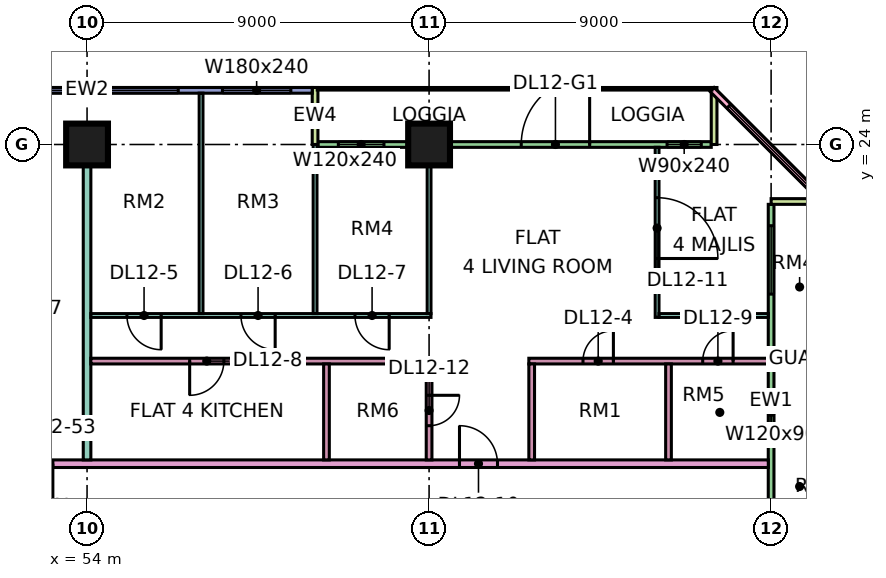
"""IFC4 building model, lengths in metres.
Left out: names, types, materials, properties, quantities, classifications, styles, units other than length and angle.
Written with IfcOpenShell. Run it as: python <this file> out.ifc"""

import sys

from ifc_helpers import new_model, si_unit, direction, frame, frame_2d, origin, origin_2d, place, context, subcontext, project, spatial, rectangle, extrude, element, fill, save


model = new_model("IFC4")
c1 = context("Model", 3, precision=1e-05, world=origin(), true_north=direction((0.0, 1.0)))
c2 = subcontext(c1, "Body", "Model", "MODEL_VIEW")
j1 = project(units=[si_unit("LENGTHUNIT", "METRE"), si_unit("PLANEANGLEUNIT", "RADIAN")], contexts=[c1])
p1 = place(None, origin())
s1 = spatial("IfcSite", under=j1, at=p1, CompositionType="ELEMENT")
p2 = place(p1, origin())
s2 = spatial("IfcBuilding", under=s1, at=p2, CompositionType="ELEMENT")
p3 = place(p2, frame((0.0, 0.0, 60.15)))
s3 = spatial("IfcBuildingStorey", under=s2, at=p3, CompositionType="ELEMENT", Elevation=60.15)
for number, where, z_axis, x_axis in (
    (1, (54.0, 24.0, 0.0), (0.0, 0.0, 1.0), (1.0, 0.0, 0.0)),
    (2, (63.0, 24.0, 0.0), (0.0, 0.0, 1.0), (1.0, 0.0, 0.0)),
):
    element("IfcColumn", number, at=place(p3, frame(where, z_axis=z_axis, x_axis=x_axis)), inside=s3, PredefinedType="COLUMN", context=c2, shape_type="SweptSolid", body=[
        extrude(rectangle(XDim=1.1, YDim=1.1, at=origin_2d()), origin(), (0.0, 0.0, 1.0), 3.75),
    ])
p4 = place(p3, frame((70.425, 24.0, 0.0), z_axis=(0.0, 0.0, 1.0), x_axis=(-1.0, 0.0, 0.0)))
e3 = element("IfcWall", 3, at=p4, inside=s3, PredefinedType="SOLIDWALL", context=c2, shape_type="SweptSolid", body=[
    extrude(rectangle(XDim=10.35, YDim=0.15, at=frame_2d((5.175, 0.0))), origin(), (0.0, 0.0, 1.0), 3.35),
])
p5 = place(p4, frame((0.262, 0.0, 0.45)))
e4 = element("IfcOpeningElement", 4, at=p5, cuts=e3, PredefinedType="OPENING", context=c2, shape_type="SweptSolid", body=[
    extrude(rectangle(XDim=0.9, YDim=2.4, at=frame_2d((0.45, 1.2))), frame((0.0, 0.085, 0.0), z_axis=(0.0, -1.0, 0.0), x_axis=(1.0, 0.0, 0.0)), (0.0, 0.0, 1.0), 0.17),
])
p6 = place(p4, frame((3.2, 0.0, 0.0)))
e5 = element("IfcOpeningElement", 5, at=p6, cuts=e3, PredefinedType="OPENING", context=c2, shape_type="SweptSolid", body=[
    extrude(rectangle(XDim=1.8, YDim=2.4, at=frame_2d((0.9, 1.2))), frame((0.0, 0.085, 0.0), z_axis=(0.0, -1.0, 0.0), x_axis=(1.0, 0.0, 0.0)), (0.0, 0.0, 1.0), 0.17),
])
p7 = place(p4, frame((8.613, 0.0, 0.45)))
e6 = element("IfcOpeningElement", 6, at=p7, cuts=e3, PredefinedType="OPENING", context=c2, shape_type="SweptSolid", body=[
    extrude(rectangle(XDim=1.2, YDim=2.4, at=frame_2d((0.6, 1.2))), frame((0.0, 0.085, 0.0), z_axis=(0.0, -1.0, 0.0), x_axis=(1.0, 0.0, 0.0)), (0.0, 0.0, 1.0), 0.17),
])
for number, where, z_axis, x_axis in (
    (7, (70.5, 25.5, 0.0), (0.0, 0.0, 1.0), (0.0, -1.0, 0.0)),
    (8, (60.0, 25.5, 0.0), (0.0, 0.0, 1.0), (0.0, -1.0, 0.0)),
):
    element("IfcWall", number, at=place(p3, frame(where, z_axis=z_axis, x_axis=x_axis)), inside=s3, PredefinedType="SOLIDWALL", context=c2, shape_type="SweptSolid", body=[
        extrude(rectangle(XDim=1.5, YDim=0.15, at=frame_2d((0.75, 0.0))), origin(), (0.0, 0.0, 1.0), 3.35),
    ])
p8 = place(p3, frame((59.925, 25.425, 0.0), z_axis=(0.0, 0.0, 1.0), x_axis=(-1.0, 0.0, 0.0)))
e9 = element("IfcWall", 9, at=p8, inside=s3, PredefinedType="SOLIDWALL", context=c2, shape_type="SweptSolid", body=[
    extrude(rectangle(XDim=11.85, YDim=0.15, at=frame_2d((5.925, 0.0))), origin(), (0.0, 0.0, 1.0), 3.35),
])
p9 = place(p8, frame((0.562, 0.0, 0.45)))
e10 = element("IfcOpeningElement", 10, at=p9, cuts=e9, PredefinedType="OPENING", context=c2, shape_type="SweptSolid", body=[
    extrude(rectangle(XDim=1.8, YDim=2.4, at=frame_2d((0.9, 1.2))), frame((0.0, 0.085, 0.0), z_axis=(0.0, -1.0, 0.0), x_axis=(1.0, 0.0, 0.0)), (0.0, 0.0, 1.0), 0.17),
])
p10 = place(p8, frame((3.525, 0.0, 0.45)))
e11 = element("IfcOpeningElement", 11, at=p10, cuts=e9, PredefinedType="OPENING", context=c2, shape_type="SweptSolid", body=[
    extrude(rectangle(XDim=1.8, YDim=2.4, at=frame_2d((0.9, 1.2))), frame((0.0, 0.085, 0.0), z_axis=(0.0, -1.0, 0.0), x_axis=(1.0, 0.0, 0.0)), (0.0, 0.0, 1.0), 0.17),
])
p11 = place(p8, frame((6.488, 0.0, 0.45)))
e12 = element("IfcOpeningElement", 12, at=p11, cuts=e9, PredefinedType="OPENING", context=c2, shape_type="SweptSolid", body=[
    extrude(rectangle(XDim=4.8, YDim=2.4, at=frame_2d((2.4, 1.2))), frame((0.0, 0.085, 0.0), z_axis=(0.0, -1.0, 0.0), x_axis=(1.0, 0.0, 0.0)), (0.0, 0.0, 1.0), 0.17),
])
p12 = place(p3, frame((72.0, 12.075, 0.0), z_axis=(0.0, 0.0, 1.0), x_axis=(0.0, 1.0, 0.0)))
e13 = element("IfcWall", 13, at=p12, inside=s3, PredefinedType="SOLIDWALL", context=c2, shape_type="SweptSolid", body=[
    extrude(rectangle(XDim=10.35, YDim=0.15, at=frame_2d((5.175, 0.0))), origin(), (0.0, 0.0, 1.0), 3.35),
])
p13 = place(p12, frame((4.275, 0.0, 1.7)))
e14 = element("IfcOpeningElement", 14, at=p13, cuts=e13, PredefinedType="OPENING", context=c2, shape_type="SweptSolid", body=[
    extrude(rectangle(XDim=1.2, YDim=0.9, at=frame_2d((0.6, 0.45))), frame((0.0, 0.085, 0.0), z_axis=(0.0, -1.0, 0.0), x_axis=(1.0, 0.0, 0.0)), (0.0, 0.0, 1.0), 0.17),
])
p14 = place(p12, frame((7.988, 0.0, 0.45)))
e15 = element("IfcOpeningElement", 15, at=p14, cuts=e13, PredefinedType="OPENING", context=c2, shape_type="SweptSolid", body=[
    extrude(rectangle(XDim=1.8, YDim=2.4, at=frame_2d((0.9, 1.2))), frame((0.0, 0.085, 0.0), z_axis=(0.0, -1.0, 0.0), x_axis=(1.0, 0.0, 0.0)), (0.0, 0.0, 1.0), 0.17),
])
p15 = place(p3, frame((73.5, 22.5, 0.0), z_axis=(0.0, 0.0, 1.0), x_axis=(-1.0, 0.0, 0.0)))
e16 = element("IfcWall", 16, at=p15, inside=s3, PredefinedType="SOLIDWALL", context=c2, shape_type="SweptSolid", body=[
    extrude(rectangle(XDim=1.5, YDim=0.15, at=frame_2d((0.75, 0.0))), origin(), (0.0, 0.0, 1.0), 3.35),
])
p16 = place(p3, frame((73.447, 22.447, 0.0), z_axis=(0.0, 0.0, 1.0), x_axis=(-0.707106781187, 0.707106781187, 0.0)))
e17 = element("IfcWall", 17, at=p16, inside=s3, PredefinedType="SOLIDWALL", context=c2, shape_type="SweptSolid", body=[
    extrude(rectangle(XDim=4.243, YDim=0.15, at=frame_2d((2.121, 0.0))), origin(), (0.0, 0.0, 1.0), 3.35),
])
p17 = place(p16, frame((0.621, 0.0, 0.45)))
e18 = element("IfcOpeningElement", 18, at=p17, cuts=e17, PredefinedType="OPENING", context=c2, shape_type="SweptSolid", body=[
    extrude(rectangle(XDim=3.0, YDim=2.4, at=frame_2d((1.5, 1.2))), frame((0.0, 0.085, 0.0), z_axis=(0.0, -1.0, 0.0), x_axis=(1.0, 0.0, 0.0)), (0.0, 0.0, 1.0), 0.17),
])
p18 = place(p3, frame((51.225, 15.6, 0.0), z_axis=(0.0, 0.0, 1.0), x_axis=(1.0, 0.0, 0.0)))
e19 = element("IfcWall", 19, at=p18, inside=s3, PredefinedType="PARTITIONING", context=c2, shape_type="SweptSolid", body=[
    extrude(rectangle(XDim=20.701, YDim=0.2, at=frame_2d((10.351, 0.0))), origin(), (0.0, 0.0, 1.0), 3.35),
])
p19 = place(p18, frame((12.575, 0.0, 0.0)))
e20 = element("IfcOpeningElement", 20, at=p19, cuts=e19, PredefinedType="OPENING", context=c2, shape_type="SweptSolid", body=[
    extrude(rectangle(XDim=1.0, YDim=2.1, at=frame_2d((0.5, 1.05))), frame((0.0, 0.11, 0.0), z_axis=(0.0, -1.0, 0.0), x_axis=(1.0, 0.0, 0.0)), (0.0, 0.0, 1.0), 0.22),
])
p20 = place(p18, frame((0.875, 0.0, 0.0)))
e21 = element("IfcOpeningElement", 21, at=p20, cuts=e19, PredefinedType="OPENING", context=c2, shape_type="SweptSolid", body=[
    extrude(rectangle(XDim=1.0, YDim=2.1, at=frame_2d((0.5, 1.05))), frame((0.0, 0.11, 0.0), z_axis=(0.0, -1.0, 0.0), x_axis=(1.0, 0.0, 0.0)), (0.0, 0.0, 1.0), 0.22),
])
p21 = place(p3, frame((54.0, 15.7, 0.0), z_axis=(0.0, 0.0, 1.0), x_axis=(0.0, 1.0, 0.0)))
e22 = element("IfcWall", 22, at=p21, inside=s3, PredefinedType="PARTITIONING", context=c2, shape_type="SweptSolid", body=[
    extrude(rectangle(XDim=8.3, YDim=0.2, at=frame_2d((4.15, 0.0))), origin(), (0.0, 0.0, 1.0), 3.35),
])
p22 = place(p3, frame((54.1, 18.3, 0.0), z_axis=(0.0, 0.0, 1.0), x_axis=(1.0, 0.0, 0.0)))
e23 = element("IfcWall", 23, at=p22, inside=s3, PredefinedType="PARTITIONING", context=c2, shape_type="SweptSolid", body=[
    extrude(rectangle(XDim=8.975, YDim=0.15, at=frame_2d((4.487, 0.0))), origin(), (0.0, 0.0, 1.0), 3.35),
])
p23 = place(p22, frame((2.6, 0.0, 0.0)))
e24 = element("IfcOpeningElement", 24, at=p23, cuts=e23, PredefinedType="OPENING", context=c2, shape_type="SweptSolid", body=[
    extrude(rectangle(XDim=0.9, YDim=2.1, at=frame_2d((0.45, 1.05))), frame((0.0, 0.085, 0.0), z_axis=(0.0, -1.0, 0.0), x_axis=(1.0, 0.0, 0.0)), (0.0, 0.0, 1.0), 0.17),
])
p24 = place(p3, frame((54.1, 19.5, 0.0), z_axis=(0.0, 0.0, 1.0), x_axis=(1.0, 0.0, 0.0)))
e25 = element("IfcWall", 25, at=p24, inside=s3, PredefinedType="PARTITIONING", context=c2, shape_type="SweptSolid", body=[
    extrude(rectangle(XDim=8.95, YDim=0.1, at=frame_2d((4.475, 0.0))), origin(), (0.0, 0.0, 1.0), 3.35),
])
p25 = place(p24, frame((0.95, 0.0, 0.0)))
e26 = element("IfcOpeningElement", 26, at=p25, cuts=e25, PredefinedType="OPENING", context=c2, shape_type="SweptSolid", body=[
    extrude(rectangle(XDim=0.9, YDim=2.1, at=frame_2d((0.45, 1.05))), frame((0.0, 0.06, 0.0), z_axis=(0.0, -1.0, 0.0), x_axis=(1.0, 0.0, 0.0)), (0.0, 0.0, 1.0), 0.12),
])
p26 = place(p24, frame((3.95, 0.0, 0.0)))
e27 = element("IfcOpeningElement", 27, at=p26, cuts=e25, PredefinedType="OPENING", context=c2, shape_type="SweptSolid", body=[
    extrude(rectangle(XDim=0.9, YDim=2.1, at=frame_2d((0.45, 1.05))), frame((0.0, 0.06, 0.0), z_axis=(0.0, -1.0, 0.0), x_axis=(1.0, 0.0, 0.0)), (0.0, 0.0, 1.0), 0.12),
])
p27 = place(p24, frame((6.95, 0.0, 0.0)))
e28 = element("IfcOpeningElement", 28, at=p27, cuts=e25, PredefinedType="OPENING", context=c2, shape_type="SweptSolid", body=[
    extrude(rectangle(XDim=0.9, YDim=2.1, at=frame_2d((0.45, 1.05))), frame((0.0, 0.06, 0.0), z_axis=(0.0, -1.0, 0.0), x_axis=(1.0, 0.0, 0.0)), (0.0, 0.0, 1.0), 0.12),
])
p28 = place(p3, frame((57.0, 19.55, 0.0), z_axis=(0.0, 0.0, 1.0), x_axis=(0.0, 1.0, 0.0)))
e29 = element("IfcWall", 29, at=p28, inside=s3, PredefinedType="PARTITIONING", context=c2, shape_type="SweptSolid", body=[
    extrude(rectangle(XDim=5.801, YDim=0.1, at=frame_2d((2.9, 0.0))), origin(), (0.0, 0.0, 1.0), 3.35),
])
p29 = place(p3, frame((60.0, 19.55, 0.0), z_axis=(0.0, 0.0, 1.0), x_axis=(0.0, 1.0, 0.0)))
e30 = element("IfcWall", 30, at=p29, inside=s3, PredefinedType="PARTITIONING", context=c2, shape_type="SweptSolid", body=[
    extrude(rectangle(XDim=4.45, YDim=0.1, at=frame_2d((2.225, 0.0))), origin(), (0.0, 0.0, 1.0), 3.35),
])
p30 = place(p3, frame((60.3, 15.7, 0.0), z_axis=(0.0, 0.0, 1.0), x_axis=(0.0, 1.0, 0.0)))
e31 = element("IfcWall", 31, at=p30, inside=s3, PredefinedType="PARTITIONING", context=c2, shape_type="SweptSolid", body=[
    extrude(rectangle(XDim=2.525, YDim=0.15, at=frame_2d((1.263, 0.0))), origin(), (0.0, 0.0, 1.0), 3.35),
])
p31 = place(p3, frame((63.0, 15.7, 0.0), z_axis=(0.0, 0.0, 1.0), x_axis=(0.0, 1.0, 0.0)))
e32 = element("IfcWall", 32, at=p31, inside=s3, PredefinedType="PARTITIONING", context=c2, shape_type="SweptSolid", body=[
    extrude(rectangle(XDim=2.525, YDim=0.15, at=frame_2d((1.263, 0.0))), origin(), (0.0, 0.0, 1.0), 3.35),
])
p32 = place(p31, frame((0.9, 0.0, 0.0)))
e33 = element("IfcOpeningElement", 33, at=p32, cuts=e32, PredefinedType="OPENING", context=c2, shape_type="SweptSolid", body=[
    extrude(rectangle(XDim=0.8, YDim=2.1, at=frame_2d((0.4, 1.05))), frame((0.0, 0.085, 0.0), z_axis=(0.0, -1.0, 0.0), x_axis=(1.0, 0.0, 0.0)), (0.0, 0.0, 1.0), 0.17),
])
p33 = place(p3, frame((63.0, 19.55, 0.0), z_axis=(0.0, 0.0, 1.0), x_axis=(0.0, 1.0, 0.0)))
e34 = element("IfcWall", 34, at=p33, inside=s3, PredefinedType="PARTITIONING", context=c2, shape_type="SweptSolid", body=[
    extrude(rectangle(XDim=4.376, YDim=0.1, at=frame_2d((2.188, 0.0))), origin(), (0.0, 0.0, 1.0), 3.35),
])
p34 = place(p3, frame((65.625, 18.3, 0.0), z_axis=(0.0, 0.0, 1.0), x_axis=(1.0, 0.0, 0.0)))
e35 = element("IfcWall", 35, at=p34, inside=s3, PredefinedType="PARTITIONING", context=c2, shape_type="SweptSolid", body=[
    extrude(rectangle(XDim=6.301, YDim=0.15, at=frame_2d((3.15, 0.0))), origin(), (0.0, 0.0, 1.0), 3.35),
])
p35 = place(p34, frame((1.425, 0.0, 0.0)))
e36 = element("IfcOpeningElement", 36, at=p35, cuts=e35, PredefinedType="OPENING", context=c2, shape_type="SweptSolid", body=[
    extrude(rectangle(XDim=0.8, YDim=2.1, at=frame_2d((0.4, 1.05))), frame((0.0, 0.085, 0.0), z_axis=(0.0, -1.0, 0.0), x_axis=(1.0, 0.0, 0.0)), (0.0, 0.0, 1.0), 0.17),
])
p36 = place(p34, frame((4.575, 0.0, 0.0)))
e37 = element("IfcOpeningElement", 37, at=p36, cuts=e35, PredefinedType="OPENING", context=c2, shape_type="SweptSolid", body=[
    extrude(rectangle(XDim=0.8, YDim=2.1, at=frame_2d((0.4, 1.05))), frame((0.0, 0.085, 0.0), z_axis=(0.0, -1.0, 0.0), x_axis=(1.0, 0.0, 0.0)), (0.0, 0.0, 1.0), 0.17),
])
p37 = place(p3, frame((65.7, 15.7, 0.0), z_axis=(0.0, 0.0, 1.0), x_axis=(0.0, 1.0, 0.0)))
e38 = element("IfcWall", 38, at=p37, inside=s3, PredefinedType="PARTITIONING", context=c2, shape_type="SweptSolid", body=[
    extrude(rectangle(XDim=2.525, YDim=0.15, at=frame_2d((1.263, 0.0))), origin(), (0.0, 0.0, 1.0), 3.35),
])
p38 = place(p3, frame((69.0, 19.45, 0.0), z_axis=(0.0, 0.0, 1.0), x_axis=(0.0, 1.0, 0.0)))
e39 = element("IfcWall", 39, at=p38, inside=s3, PredefinedType="PARTITIONING", context=c2, shape_type="SweptSolid", body=[
    extrude(rectangle(XDim=4.476, YDim=0.1, at=frame_2d((2.238, 0.0))), origin(), (0.0, 0.0, 1.0), 3.35),
])
p39 = place(p38, frame((1.55, 0.0, 0.0)))
e40 = element("IfcOpeningElement", 40, at=p39, cuts=e39, PredefinedType="OPENING", context=c2, shape_type="SweptSolid", body=[
    extrude(rectangle(XDim=1.6, YDim=2.1, at=frame_2d((0.8, 1.05))), frame((0.0, 0.06, 0.0), z_axis=(0.0, -1.0, 0.0), x_axis=(1.0, 0.0, 0.0)), (0.0, 0.0, 1.0), 0.12),
])
p40 = place(p3, frame((69.05, 19.5, 0.0), z_axis=(0.0, 0.0, 1.0), x_axis=(1.0, 0.0, 0.0)))
e41 = element("IfcWall", 41, at=p40, inside=s3, PredefinedType="PARTITIONING", context=c2, shape_type="SweptSolid", body=[
    extrude(rectangle(XDim=2.876, YDim=0.1, at=frame_2d((1.438, 0.0))), origin(), (0.0, 0.0, 1.0), 3.35),
])
p41 = place(p3, frame((69.3, 15.7, 0.0), z_axis=(0.0, 0.0, 1.0), x_axis=(0.0, 1.0, 0.0)))
e42 = element("IfcWall", 42, at=p41, inside=s3, PredefinedType="PARTITIONING", context=c2, shape_type="SweptSolid", body=[
    extrude(rectangle(XDim=2.525, YDim=0.15, at=frame_2d((1.263, 0.0))), origin(), (0.0, 0.0, 1.0), 3.35),
])
p42 = place(p5, origin())
e43 = element("IfcWindow", 43, at=p42, inside=s3, PartitioningType="SINGLE_PANEL", PredefinedType="WINDOW", context=c2, shape_type="SweptSolid", body=[
    extrude(rectangle(XDim=0.9, YDim=2.4, at=frame_2d((0.45, 1.2))), frame((0.0, 0.03, 0.0), z_axis=(0.0, -1.0, 0.0), x_axis=(1.0, 0.0, 0.0)), (0.0, 0.0, 1.0), 0.06),
])
fill(e4, e43)
p43 = place(p6, frame((1.8, 0.0, 0.0), z_axis=(0.0, 0.0, 1.0), x_axis=(-1.0, 0.0, 0.0)))
e44 = element("IfcDoor", 44, at=p43, inside=s3, OperationType="DOUBLE_DOOR_SINGLE_SWING", PredefinedType="DOOR", context=c2, shape_type="SweptSolid", body=[
    extrude(rectangle(XDim=1.8, YDim=2.4, at=frame_2d((0.9, 1.2))), frame((0.0, 0.025, 0.0), z_axis=(0.0, -1.0, 0.0), x_axis=(1.0, 0.0, 0.0)), (0.0, 0.0, 1.0), 0.05),
])
fill(e5, e44)
p44 = place(p7, origin())
e45 = element("IfcWindow", 45, at=p44, inside=s3, PartitioningType="SINGLE_PANEL", PredefinedType="WINDOW", context=c2, shape_type="SweptSolid", body=[
    extrude(rectangle(XDim=1.2, YDim=2.4, at=frame_2d((0.6, 1.2))), frame((0.0, 0.03, 0.0), z_axis=(0.0, -1.0, 0.0), x_axis=(1.0, 0.0, 0.0)), (0.0, 0.0, 1.0), 0.06),
])
fill(e6, e45)
p45 = place(p9, origin())
e46 = element("IfcWindow", 46, at=p45, inside=s3, PartitioningType="SINGLE_PANEL", PredefinedType="WINDOW", context=c2, shape_type="SweptSolid", body=[
    extrude(rectangle(XDim=1.8, YDim=2.4, at=frame_2d((0.9, 1.2))), frame((0.0, 0.03, 0.0), z_axis=(0.0, -1.0, 0.0), x_axis=(1.0, 0.0, 0.0)), (0.0, 0.0, 1.0), 0.06),
])
fill(e10, e46)
p46 = place(p10, origin())
e47 = element("IfcWindow", 47, at=p46, inside=s3, PartitioningType="SINGLE_PANEL", PredefinedType="WINDOW", context=c2, shape_type="SweptSolid", body=[
    extrude(rectangle(XDim=1.8, YDim=2.4, at=frame_2d((0.9, 1.2))), frame((0.0, 0.03, 0.0), z_axis=(0.0, -1.0, 0.0), x_axis=(1.0, 0.0, 0.0)), (0.0, 0.0, 1.0), 0.06),
])
fill(e11, e47)
p47 = place(p11, origin())
e48 = element("IfcWindow", 48, at=p47, inside=s3, PartitioningType="SINGLE_PANEL", PredefinedType="WINDOW", context=c2, shape_type="SweptSolid", body=[
    extrude(rectangle(XDim=4.8, YDim=2.4, at=frame_2d((2.4, 1.2))), frame((0.0, 0.03, 0.0), z_axis=(0.0, -1.0, 0.0), x_axis=(1.0, 0.0, 0.0)), (0.0, 0.0, 1.0), 0.06),
])
fill(e12, e48)
p48 = place(p13, origin())
e49 = element("IfcWindow", 49, at=p48, inside=s3, PartitioningType="SINGLE_PANEL", PredefinedType="WINDOW", context=c2, shape_type="SweptSolid", body=[
    extrude(rectangle(XDim=1.2, YDim=0.9, at=frame_2d((0.6, 0.45))), frame((0.0, 0.03, 0.0), z_axis=(0.0, -1.0, 0.0), x_axis=(1.0, 0.0, 0.0)), (0.0, 0.0, 1.0), 0.06),
])
fill(e14, e49)
p49 = place(p14, origin())
e50 = element("IfcWindow", 50, at=p49, inside=s3, PartitioningType="SINGLE_PANEL", PredefinedType="WINDOW", context=c2, shape_type="SweptSolid", body=[
    extrude(rectangle(XDim=1.8, YDim=2.4, at=frame_2d((0.9, 1.2))), frame((0.0, 0.03, 0.0), z_axis=(0.0, -1.0, 0.0), x_axis=(1.0, 0.0, 0.0)), (0.0, 0.0, 1.0), 0.06),
])
fill(e15, e50)
p50 = place(p17, origin())
e51 = element("IfcWindow", 51, at=p50, inside=s3, PartitioningType="SINGLE_PANEL", PredefinedType="WINDOW", context=c2, shape_type="SweptSolid", body=[
    extrude(rectangle(XDim=3.0, YDim=2.4, at=frame_2d((1.5, 1.2))), frame((0.0, 0.03, 0.0), z_axis=(0.0, -1.0, 0.0), x_axis=(1.0, 0.0, 0.0)), (0.0, 0.0, 1.0), 0.06),
])
fill(e18, e51)
p51 = place(p35, frame((0.8, 0.0, 0.0), z_axis=(0.0, 0.0, 1.0), x_axis=(-1.0, 0.0, 0.0)))
e52 = element("IfcDoor", 52, at=p51, inside=s3, OperationType="SINGLE_SWING_RIGHT", PredefinedType="DOOR", context=c2, shape_type="SweptSolid", body=[
    extrude(rectangle(XDim=0.8, YDim=2.1, at=frame_2d((0.4, 1.05))), frame((0.0, 0.025, 0.0), z_axis=(0.0, -1.0, 0.0), x_axis=(1.0, 0.0, 0.0)), (0.0, 0.0, 1.0), 0.05),
])
fill(e36, e52)
p52 = place(p25, origin())
e53 = element("IfcDoor", 53, at=p52, inside=s3, OperationType="SINGLE_SWING_RIGHT", PredefinedType="DOOR", context=c2, shape_type="SweptSolid", body=[
    extrude(rectangle(XDim=0.9, YDim=2.1, at=frame_2d((0.45, 1.05))), frame((0.0, 0.025, 0.0), z_axis=(0.0, -1.0, 0.0), x_axis=(1.0, 0.0, 0.0)), (0.0, 0.0, 1.0), 0.05),
])
fill(e26, e53)
p53 = place(p26, origin())
e54 = element("IfcDoor", 54, at=p53, inside=s3, OperationType="SINGLE_SWING_RIGHT", PredefinedType="DOOR", context=c2, shape_type="SweptSolid", body=[
    extrude(rectangle(XDim=0.9, YDim=2.1, at=frame_2d((0.45, 1.05))), frame((0.0, 0.025, 0.0), z_axis=(0.0, -1.0, 0.0), x_axis=(1.0, 0.0, 0.0)), (0.0, 0.0, 1.0), 0.05),
])
fill(e27, e54)
p54 = place(p27, origin())
e55 = element("IfcDoor", 55, at=p54, inside=s3, OperationType="SINGLE_SWING_RIGHT", PredefinedType="DOOR", context=c2, shape_type="SweptSolid", body=[
    extrude(rectangle(XDim=0.9, YDim=2.1, at=frame_2d((0.45, 1.05))), frame((0.0, 0.025, 0.0), z_axis=(0.0, -1.0, 0.0), x_axis=(1.0, 0.0, 0.0)), (0.0, 0.0, 1.0), 0.05),
])
fill(e28, e55)
p55 = place(p23, frame((0.9, 0.0, 0.0), z_axis=(0.0, 0.0, 1.0), x_axis=(-1.0, 0.0, 0.0)))
e56 = element("IfcDoor", 56, at=p55, inside=s3, OperationType="SINGLE_SWING_LEFT", PredefinedType="DOOR", context=c2, shape_type="SweptSolid", body=[
    extrude(rectangle(XDim=0.9, YDim=2.1, at=frame_2d((0.45, 1.05))), frame((0.0, 0.025, 0.0), z_axis=(0.0, -1.0, 0.0), x_axis=(1.0, 0.0, 0.0)), (0.0, 0.0, 1.0), 0.05),
])
fill(e24, e56)
p56 = place(p36, frame((0.8, 0.0, 0.0), z_axis=(0.0, 0.0, 1.0), x_axis=(-1.0, 0.0, 0.0)))
e57 = element("IfcDoor", 57, at=p56, inside=s3, OperationType="SINGLE_SWING_RIGHT", PredefinedType="DOOR", context=c2, shape_type="SweptSolid", body=[
    extrude(rectangle(XDim=0.8, YDim=2.1, at=frame_2d((0.4, 1.05))), frame((0.0, 0.025, 0.0), z_axis=(0.0, -1.0, 0.0), x_axis=(1.0, 0.0, 0.0)), (0.0, 0.0, 1.0), 0.05),
])
fill(e37, e57)
p57 = place(p19, origin())
e58 = element("IfcDoor", 58, at=p57, inside=s3, OperationType="SINGLE_SWING_LEFT", PredefinedType="DOOR", context=c2, shape_type="SweptSolid", body=[
    extrude(rectangle(XDim=1.0, YDim=2.1, at=frame_2d((0.5, 1.05))), frame((0.0, 0.025, 0.0), z_axis=(0.0, -1.0, 0.0), x_axis=(1.0, 0.0, 0.0)), (0.0, 0.0, 1.0), 0.05),
])
fill(e20, e58)
p58 = place(p39, frame((1.6, 0.0, 0.0), z_axis=(0.0, 0.0, 1.0), x_axis=(-1.0, 0.0, 0.0)))
e59 = element("IfcDoor", 59, at=p58, inside=s3, OperationType="DOUBLE_DOOR_SINGLE_SWING", PredefinedType="DOOR", context=c2, shape_type="SweptSolid", body=[
    extrude(rectangle(XDim=1.6, YDim=2.1, at=frame_2d((0.8, 1.05))), frame((0.0, 0.025, 0.0), z_axis=(0.0, -1.0, 0.0), x_axis=(1.0, 0.0, 0.0)), (0.0, 0.0, 1.0), 0.05),
])
fill(e40, e59)
p59 = place(p32, origin())
e60 = element("IfcDoor", 60, at=p59, inside=s3, OperationType="SINGLE_SWING_RIGHT", PredefinedType="DOOR", context=c2, shape_type="SweptSolid", body=[
    extrude(rectangle(XDim=0.8, YDim=2.1, at=frame_2d((0.4, 1.05))), frame((0.0, 0.025, 0.0), z_axis=(0.0, -1.0, 0.0), x_axis=(1.0, 0.0, 0.0)), (0.0, 0.0, 1.0), 0.05),
])
fill(e33, e60)
p60 = place(p20, origin())
e61 = element("IfcDoor", 61, at=p60, inside=s3, OperationType="SINGLE_SWING_RIGHT", PredefinedType="DOOR", context=c2, shape_type="SweptSolid", body=[
    extrude(rectangle(XDim=1.0, YDim=2.1, at=frame_2d((0.5, 1.05))), frame((0.0, 0.025, 0.0), z_axis=(0.0, -1.0, 0.0), x_axis=(1.0, 0.0, 0.0)), (0.0, 0.0, 1.0), 0.05),
])
fill(e21, e61)
save(model, sys.argv[1])
